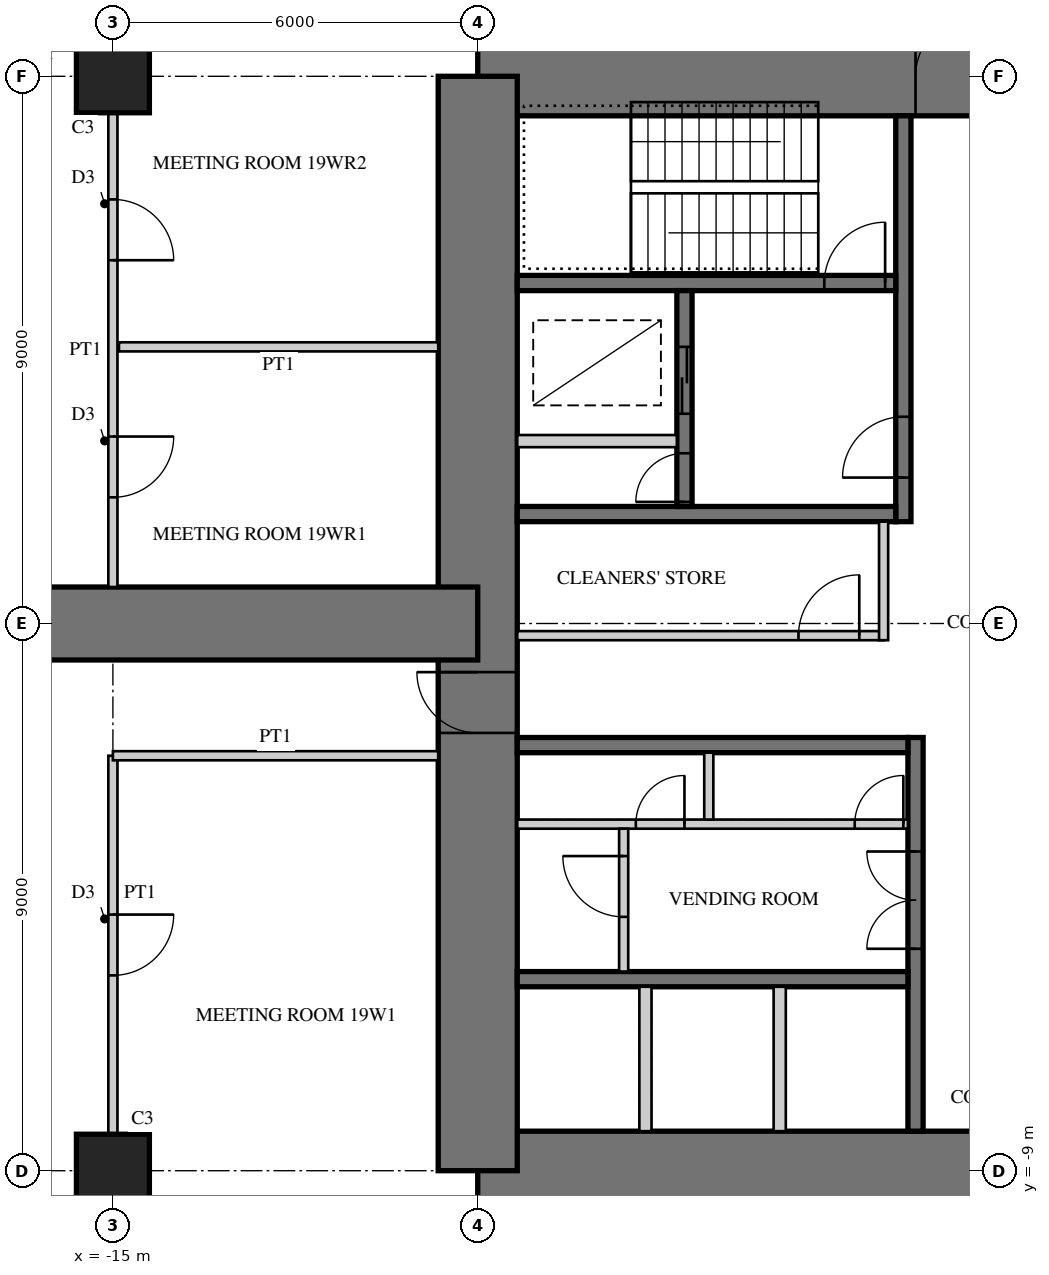
"""IFC4 building model, lengths in metres.
Left out: names, types, materials, properties, quantities, classifications, styles, units other than length and angle.
Written with IfcOpenShell. Run it as: python <this file> out.ifc"""

import sys

from ifc_helpers import new_model, si_unit, direction, frame, frame_2d, origin, origin_2d, place, context, subcontext, project, spatial, rectangle, extrude, element, fill, save


model = new_model("IFC4")
c1 = context("Model", 3, precision=1e-05, world=origin(), true_north=direction((0.0, 1.0)))
c2 = subcontext(c1, "Body", "Model", "MODEL_VIEW")
j1 = project(units=[si_unit("LENGTHUNIT", "METRE"), si_unit("PLANEANGLEUNIT", "RADIAN")], contexts=[c1])
p1 = place(None, origin())
s1 = spatial("IfcSite", under=j1, at=p1, CompositionType="ELEMENT")
p2 = place(p1, origin())
s2 = spatial("IfcBuilding", under=s1, at=p2, CompositionType="ELEMENT")
p3 = place(p2, frame((0.0, 0.0, 79.5)))
s3 = spatial("IfcBuildingStorey", under=s2, at=p3, CompositionType="ELEMENT", Elevation=79.5)
p4 = place(p3, frame((9.0, 9.0, 0.0), z_axis=(0.0, 0.0, 1.0), x_axis=(-1.0, 0.0, 0.0)))
e1 = element("IfcWall", 1, at=p4, inside=s3, PredefinedType="SHEAR", context=c2, shape_type="SweptSolid", body=[
    extrude(rectangle(XDim=18.0, YDim=1.3, at=frame_2d((9.0, 0.0))), origin(), (0.0, 0.0, 1.0), 4.0),
])
p5 = place(p4, frame((9.8, 0.0, 0.0)))
e2 = element("IfcOpeningElement", 2, at=p5, cuts=e1, PredefinedType="OPENING", context=c2, shape_type="SweptSolid", body=[
    extrude(rectangle(XDim=1.0, YDim=2.4, at=frame_2d((0.5, 1.2))), frame((0.0, 0.66, 0.0), z_axis=(0.0, -1.0, 0.0), x_axis=(1.0, 0.0, 0.0)), (0.0, 0.0, 1.0), 1.32),
])
p6 = place(p3, frame((-9.0, -9.0, 0.0), z_axis=(0.0, 0.0, 1.0), x_axis=(1.0, 0.0, 0.0)))
e3 = element("IfcWall", 3, at=p6, inside=s3, PredefinedType="SHEAR", context=c2, shape_type="SweptSolid", body=[
    extrude(rectangle(XDim=18.0, YDim=1.3, at=frame_2d((9.0, 0.0))), origin(), (0.0, 0.0, 1.0), 4.0),
])
p7 = place(p6, frame((9.8, 0.0, 0.0)))
e4 = element("IfcOpeningElement", 4, at=p7, cuts=e3, PredefinedType="OPENING", context=c2, shape_type="SweptSolid", body=[
    extrude(rectangle(XDim=1.0, YDim=2.4, at=frame_2d((0.5, 1.2))), frame((0.0, 0.66, 0.0), z_axis=(0.0, -1.0, 0.0), x_axis=(1.0, 0.0, 0.0)), (0.0, 0.0, 1.0), 1.32),
])
p8 = place(p3, frame((-9.0, 9.0, 0.0), z_axis=(0.0, 0.0, 1.0), x_axis=(0.0, -1.0, 0.0)))
e5 = element("IfcWall", 5, at=p8, inside=s3, PredefinedType="SHEAR", context=c2, shape_type="SweptSolid", body=[
    extrude(rectangle(XDim=18.0, YDim=1.3, at=frame_2d((9.0, 0.0))), origin(), (0.0, 0.0, 1.0), 4.0),
])
p9 = place(p8, frame((9.8, 0.0, 0.0)))
e6 = element("IfcOpeningElement", 6, at=p9, cuts=e5, PredefinedType="OPENING", context=c2, shape_type="SweptSolid", body=[
    extrude(rectangle(XDim=1.0, YDim=2.4, at=frame_2d((0.5, 1.2))), frame((0.0, 0.66, 0.0), z_axis=(0.0, -1.0, 0.0), x_axis=(1.0, 0.0, 0.0)), (0.0, 0.0, 1.0), 1.32),
])
p10 = place(p3, frame((-2.0, 1.675, 0.0), z_axis=(0.0, 0.0, 1.0), x_axis=(0.0, 1.0, 0.0)))
e7 = element("IfcWall", 7, at=p10, inside=s3, PredefinedType="SHEAR", context=c2, shape_type="SweptSolid", body=[
    extrude(rectangle(XDim=6.675, YDim=0.25, at=frame_2d((3.337, 0.0))), origin(), (0.0, 0.0, 1.0), 4.0),
])
p11 = place(p10, frame((0.725, 0.0, 0.0)))
e8 = element("IfcOpeningElement", 8, at=p11, cuts=e7, PredefinedType="OPENING", context=c2, shape_type="SweptSolid", body=[
    extrude(rectangle(XDim=1.0, YDim=2.1, at=frame_2d((0.5, 1.05))), frame((0.0, 0.135, 0.0), z_axis=(0.0, -1.0, 0.0), x_axis=(1.0, 0.0, 0.0)), (0.0, 0.0, 1.0), 0.27),
])
p12 = place(p3, frame((-2.125, 1.8, 0.0), z_axis=(0.0, 0.0, 1.0), x_axis=(-1.0, 0.0, 0.0)))
e9 = element("IfcWall", 9, at=p12, inside=s3, PredefinedType="SHEAR", context=c2, shape_type="SweptSolid", body=[
    extrude(rectangle(XDim=6.225, YDim=0.25, at=frame_2d((3.113, 0.0))), origin(), (0.0, 0.0, 1.0), 4.0),
])
p13 = place(p3, frame((-2.125, 5.6, 0.0), z_axis=(0.0, 0.0, 1.0), x_axis=(-1.0, 0.0, 0.0)))
e10 = element("IfcWall", 10, at=p13, inside=s3, PredefinedType="SHEAR", context=c2, shape_type="SweptSolid", body=[
    extrude(rectangle(XDim=6.225, YDim=0.25, at=frame_2d((3.113, 0.0))), origin(), (0.0, 0.0, 1.0), 4.0),
])
p14 = place(p13, frame((0.175, 0.0, 0.0)))
e11 = element("IfcOpeningElement", 11, at=p14, cuts=e10, PredefinedType="OPENING", context=c2, shape_type="SweptSolid", body=[
    extrude(rectangle(XDim=1.0, YDim=2.1, at=frame_2d((0.5, 1.05))), frame((0.0, 0.135, 0.0), z_axis=(0.0, -1.0, 0.0), x_axis=(1.0, 0.0, 0.0)), (0.0, 0.0, 1.0), 0.27),
])
p15 = place(p3, frame((-5.6, 1.925, 0.0), z_axis=(0.0, 0.0, 1.0), x_axis=(0.0, 1.0, 0.0)))
e12 = element("IfcWall", 12, at=p15, inside=s3, PredefinedType="SHEAR", context=c2, shape_type="SweptSolid", body=[
    extrude(rectangle(XDim=3.55, YDim=0.25, at=frame_2d((1.775, 0.0))), origin(), (0.0, 0.0, 1.0), 4.0),
])
p16 = place(p15, frame((1.525, 0.0, 0.0)))
e13 = element("IfcOpeningElement", 13, at=p16, cuts=e12, PredefinedType="OPENING", context=c2, shape_type="SweptSolid", body=[
    extrude(rectangle(XDim=1.1, YDim=2.2, at=frame_2d((0.55, 1.1))), frame((0.0, 0.135, 0.0), z_axis=(0.0, -1.0, 0.0), x_axis=(1.0, 0.0, 0.0)), (0.0, 0.0, 1.0), 0.27),
])
p17 = place(p15, frame((0.075, 0.0, 0.0)))
e14 = element("IfcOpeningElement", 14, at=p17, cuts=e12, PredefinedType="OPENING", context=c2, shape_type="SweptSolid", body=[
    extrude(rectangle(XDim=0.8, YDim=2.1, at=frame_2d((0.4, 1.05))), frame((0.0, 0.135, 0.0), z_axis=(0.0, -1.0, 0.0), x_axis=(1.0, 0.0, 0.0)), (0.0, 0.0, 1.0), 0.27),
])
p18 = place(p3, frame((-5.725, 3.0, 0.0), z_axis=(0.0, 0.0, 1.0), x_axis=(-1.0, 0.0, 0.0)))
e15 = element("IfcWall", 15, at=p18, inside=s3, PredefinedType="PARTITIONING", context=c2, shape_type="SweptSolid", body=[
    extrude(rectangle(XDim=2.625, YDim=0.2, at=frame_2d((1.312, 0.0))), origin(), (0.0, 0.0, 1.0), 4.0),
])
p19 = place(p3, frame((-1.8, -1.875, 0.0), z_axis=(0.0, 0.0, 1.0), x_axis=(0.0, -1.0, 0.0)))
e16 = element("IfcWall", 16, at=p19, inside=s3, PredefinedType="SHEAR", context=c2, shape_type="SweptSolid", body=[
    extrude(rectangle(XDim=6.475, YDim=0.25, at=frame_2d((3.238, 0.0))), origin(), (0.0, 0.0, 1.0), 4.0),
])
p20 = place(p19, frame((1.875, 0.0, 0.0)))
e17 = element("IfcOpeningElement", 17, at=p20, cuts=e16, PredefinedType="OPENING", context=c2, shape_type="SweptSolid", body=[
    extrude(rectangle(XDim=1.6, YDim=2.4, at=frame_2d((0.8, 1.2))), frame((0.0, 0.135, 0.0), z_axis=(0.0, -1.0, 0.0), x_axis=(1.0, 0.0, 0.0)), (0.0, 0.0, 1.0), 0.27),
])
for number, where, z_axis, x_axis in (
    (18, (-1.925, -2.0, 0.0), (0.0, 0.0, 1.0), (-1.0, 0.0, 0.0)),
    (19, (-1.925, -5.85, 0.0), (0.0, 0.0, 1.0), (-1.0, 0.0, 0.0)),
):
    element("IfcWall", number, at=place(p3, frame(where, z_axis=z_axis, x_axis=x_axis)), inside=s3, PredefinedType="SHEAR", context=c2, shape_type="SweptSolid", body=[
        extrude(rectangle(XDim=6.425, YDim=0.25, at=frame_2d((3.212, 0.0))), origin(), (0.0, 0.0, 1.0), 4.0),
    ])
p21 = place(p3, frame((-1.925, -3.3, 0.0), z_axis=(0.0, 0.0, 1.0), x_axis=(-1.0, 0.0, 0.0)))
e20 = element("IfcWall", 20, at=p21, inside=s3, PredefinedType="PARTITIONING", context=c2, shape_type="SweptSolid", body=[
    extrude(rectangle(XDim=6.425, YDim=0.15, at=frame_2d((3.212, 0.0))), origin(), (0.0, 0.0, 1.0), 4.0),
])
p22 = place(p21, frame((0.075, 0.0, 0.0)))
e21 = element("IfcOpeningElement", 21, at=p22, cuts=e20, PredefinedType="OPENING", context=c2, shape_type="SweptSolid", body=[
    extrude(rectangle(XDim=0.8, YDim=2.1, at=frame_2d((0.4, 1.05))), frame((0.0, 0.085, 0.0), z_axis=(0.0, -1.0, 0.0), x_axis=(1.0, 0.0, 0.0)), (0.0, 0.0, 1.0), 0.17),
])
p23 = place(p21, frame((3.675, 0.0, 0.0)))
e22 = element("IfcOpeningElement", 22, at=p23, cuts=e20, PredefinedType="OPENING", context=c2, shape_type="SweptSolid", body=[
    extrude(rectangle(XDim=0.8, YDim=2.1, at=frame_2d((0.4, 1.05))), frame((0.0, 0.085, 0.0), z_axis=(0.0, -1.0, 0.0), x_axis=(1.0, 0.0, 0.0)), (0.0, 0.0, 1.0), 0.17),
])
p24 = place(p3, frame((-5.2, -2.125, 0.0), z_axis=(0.0, 0.0, 1.0), x_axis=(0.0, -1.0, 0.0)))
e23 = element("IfcWall", 23, at=p24, inside=s3, PredefinedType="PARTITIONING", context=c2, shape_type="SweptSolid", body=[
    extrude(rectangle(XDim=1.1, YDim=0.15, at=frame_2d((0.55, 0.0))), origin(), (0.0, 0.0, 1.0), 4.0),
])
for number, where, z_axis, x_axis in (
    (24, (-4.033, -5.975, 0.0), (0.0, 0.0, 1.0), (0.0, -1.0, 0.0)),
    (25, (-6.242, -5.975, 0.0), (0.0, 0.0, 1.0), (0.0, -1.0, 0.0)),
):
    element("IfcWall", number, at=place(p3, frame(where, z_axis=z_axis, x_axis=x_axis)), inside=s3, PredefinedType="PARTITIONING", context=c2, shape_type="SweptSolid", body=[
        extrude(rectangle(XDim=2.375, YDim=0.2, at=frame_2d((1.188, 0.0))), origin(), (0.0, 0.0, 1.0), 4.0),
    ])
p25 = place(p3, frame((-9.0, 0.0, 0.0), z_axis=(0.0, 0.0, 1.0), x_axis=(-1.0, 0.0, 0.0)))
e26 = element("IfcWall", 26, at=p25, inside=s3, PredefinedType="SHEAR", context=c2, shape_type="SweptSolid", body=[
    extrude(rectangle(XDim=18.0, YDim=1.2, at=frame_2d((9.0, 0.0))), origin(), (0.0, 0.0, 1.0), 4.0),
])
p26 = place(p25, frame((9.9, 0.0, 0.0)))
e27 = element("IfcOpeningElement", 27, at=p26, cuts=e26, PredefinedType="OPENING", context=c2, shape_type="SweptSolid", body=[
    extrude(rectangle(XDim=1.0, YDim=2.2, at=frame_2d((0.5, 1.1))), frame((0.0, 0.61, 0.0), z_axis=(0.0, -1.0, 0.0), x_axis=(1.0, 0.0, 0.0)), (0.0, 0.0, 1.0), 1.22),
])
for number, where, z_axis, x_axis in (
    (28, (-15.0, 9.0, 0.0), (0.0, 0.0, 1.0), (1.0, 0.0, 0.0)),
    (29, (-15.0, -9.0, 0.0), (0.0, 0.0, 1.0), (1.0, 0.0, 0.0)),
):
    element("IfcColumn", number, at=place(p3, frame(where, z_axis=z_axis, x_axis=x_axis)), inside=s3, PredefinedType="COLUMN", context=c2, shape_type="SweptSolid", body=[
        extrude(rectangle(XDim=1.2, YDim=1.2, at=origin_2d()), origin(), (0.0, 0.0, 1.0), 4.0),
    ])
p27 = place(p3, frame((-2.325, -0.2, 0.0), z_axis=(0.0, 0.0, 1.0), x_axis=(-1.0, 0.0, 0.0)))
e30 = element("IfcWall", 30, at=p27, inside=s3, PredefinedType="PARTITIONING", context=c2, shape_type="SweptSolid", body=[
    extrude(rectangle(XDim=6.025, YDim=0.15, at=frame_2d((3.013, 0.0))), origin(), (0.0, 0.0, 1.0), 3.8),
])
p28 = place(p27, frame((0.4, 0.0, 0.0)))
e31 = element("IfcOpeningElement", 31, at=p28, cuts=e30, PredefinedType="OPENING", context=c2, shape_type="SweptSolid", body=[
    extrude(rectangle(XDim=1.0, YDim=2.1, at=frame_2d((0.5, 1.05))), frame((0.0, 0.085, 0.0), z_axis=(0.0, -1.0, 0.0), x_axis=(1.0, 0.0, 0.0)), (0.0, 0.0, 1.0), 0.17),
])
p29 = place(p3, frame((-2.325, 1.675, 0.0), z_axis=(0.0, 0.0, 1.0), x_axis=(0.0, -1.0, 0.0)))
e32 = element("IfcWall", 32, at=p29, inside=s3, PredefinedType="PARTITIONING", context=c2, shape_type="SweptSolid", body=[
    extrude(rectangle(XDim=1.95, YDim=0.15, at=frame_2d((0.975, 0.0))), origin(), (0.0, 0.0, 1.0), 3.8),
])
p30 = place(p3, frame((-6.6, -3.375, 0.0), z_axis=(0.0, 0.0, 1.0), x_axis=(0.0, -1.0, 0.0)))
e33 = element("IfcWall", 33, at=p30, inside=s3, PredefinedType="PARTITIONING", context=c2, shape_type="SweptSolid", body=[
    extrude(rectangle(XDim=2.35, YDim=0.15, at=frame_2d((1.175, 0.0))), origin(), (0.0, 0.0, 1.0), 3.8),
])
p31 = place(p30, frame((0.45, 0.0, 0.0)))
e34 = element("IfcOpeningElement", 34, at=p31, cuts=e33, PredefinedType="OPENING", context=c2, shape_type="SweptSolid", body=[
    extrude(rectangle(XDim=1.0, YDim=2.1, at=frame_2d((0.5, 1.05))), frame((0.0, 0.085, 0.0), z_axis=(0.0, -1.0, 0.0), x_axis=(1.0, 0.0, 0.0)), (0.0, 0.0, 1.0), 0.17),
])
p32 = place(p3, frame((-15.0, -2.175, 0.0), z_axis=(0.0, 0.0, 1.0), x_axis=(0.0, -1.0, 0.0)))
e35 = element("IfcWall", 35, at=p32, inside=s3, PredefinedType="PARTITIONING", context=c2, shape_type="SweptSolid", body=[
    extrude(rectangle(XDim=6.225, YDim=0.15, at=frame_2d((3.112, 0.0))), origin(), (0.0, 0.0, 1.0), 2.95),
])
p33 = place(p32, frame((2.613, 0.0, 0.0)))
e36 = element("IfcOpeningElement", 36, at=p33, cuts=e35, PredefinedType="OPENING", context=c2, shape_type="SweptSolid", body=[
    extrude(rectangle(XDim=1.0, YDim=2.1, at=frame_2d((0.5, 1.05))), frame((0.0, 0.085, 0.0), z_axis=(0.0, -1.0, 0.0), x_axis=(1.0, 0.0, 0.0)), (0.0, 0.0, 1.0), 0.17),
])
p34 = place(p3, frame((-9.65, -2.175, 0.0), z_axis=(0.0, 0.0, 1.0), x_axis=(-1.0, 0.0, 0.0)))
e37 = element("IfcWall", 37, at=p34, inside=s3, PredefinedType="PARTITIONING", context=c2, shape_type="SweptSolid", body=[
    extrude(rectangle(XDim=5.35, YDim=0.15, at=frame_2d((2.675, 0.0))), origin(), (0.0, 0.0, 1.0), 3.8),
])
p35 = place(p3, frame((-15.0, 8.4, 0.0), z_axis=(0.0, 0.0, 1.0), x_axis=(0.0, -1.0, 0.0)))
e38 = element("IfcWall", 38, at=p35, inside=s3, PredefinedType="PARTITIONING", context=c2, shape_type="SweptSolid", body=[
    extrude(rectangle(XDim=7.8, YDim=0.15, at=frame_2d((3.9, 0.0))), origin(), (0.0, 0.0, 1.0), 2.95),
])
p36 = place(p35, frame((1.425, 0.0, 0.0)))
e39 = element("IfcOpeningElement", 39, at=p36, cuts=e38, PredefinedType="OPENING", context=c2, shape_type="SweptSolid", body=[
    extrude(rectangle(XDim=1.0, YDim=2.1, at=frame_2d((0.5, 1.05))), frame((0.0, 0.085, 0.0), z_axis=(0.0, -1.0, 0.0), x_axis=(1.0, 0.0, 0.0)), (0.0, 0.0, 1.0), 0.17),
])
p37 = place(p35, frame((5.325, 0.0, 0.0)))
e40 = element("IfcOpeningElement", 40, at=p37, cuts=e38, PredefinedType="OPENING", context=c2, shape_type="SweptSolid", body=[
    extrude(rectangle(XDim=1.0, YDim=2.1, at=frame_2d((0.5, 1.05))), frame((0.0, 0.085, 0.0), z_axis=(0.0, -1.0, 0.0), x_axis=(1.0, 0.0, 0.0)), (0.0, 0.0, 1.0), 0.17),
])
p38 = place(p3, frame((-9.65, 4.55, 0.0), z_axis=(0.0, 0.0, 1.0), x_axis=(-1.0, 0.0, 0.0)))
e41 = element("IfcWall", 41, at=p38, inside=s3, PredefinedType="PARTITIONING", context=c2, shape_type="SweptSolid", body=[
    extrude(rectangle(XDim=5.25, YDim=0.15, at=frame_2d((2.625, 0.0))), origin(), (0.0, 0.0, 1.0), 3.8),
])
p39 = place(p28, frame((1.0, 0.0, 0.0), z_axis=(0.0, 0.0, 1.0), x_axis=(-1.0, 0.0, 0.0)))
e42 = element("IfcDoor", 42, at=p39, inside=s3, OperationType="SINGLE_SWING_RIGHT", PredefinedType="DOOR", context=c2, shape_type="SweptSolid", body=[
    extrude(rectangle(XDim=1.0, YDim=2.1, at=frame_2d((0.5, 1.05))), frame((0.0, 0.025, 0.0), z_axis=(0.0, -1.0, 0.0), x_axis=(1.0, 0.0, 0.0)), (0.0, 0.0, 1.0), 0.05),
])
fill(e31, e42)
p40 = place(p31, frame((1.0, 0.0, 0.0), z_axis=(0.0, 0.0, 1.0), x_axis=(-1.0, 0.0, 0.0)))
e43 = element("IfcDoor", 43, at=p40, inside=s3, OperationType="SINGLE_SWING_RIGHT", PredefinedType="DOOR", context=c2, shape_type="SweptSolid", body=[
    extrude(rectangle(XDim=1.0, YDim=2.1, at=frame_2d((0.5, 1.05))), frame((0.0, 0.025, 0.0), z_axis=(0.0, -1.0, 0.0), x_axis=(1.0, 0.0, 0.0)), (0.0, 0.0, 1.0), 0.05),
])
fill(e34, e43)
p41 = place(p33, origin())
e44 = element("IfcDoor", 44, at=p41, inside=s3, OperationType="SINGLE_SWING_LEFT", PredefinedType="DOOR", context=c2, shape_type="SweptSolid", body=[
    extrude(rectangle(XDim=1.0, YDim=2.1, at=frame_2d((0.5, 1.05))), frame((0.0, 0.025, 0.0), z_axis=(0.0, -1.0, 0.0), x_axis=(1.0, 0.0, 0.0)), (0.0, 0.0, 1.0), 0.05),
])
fill(e36, e44)
p42 = place(p36, origin())
e45 = element("IfcDoor", 45, at=p42, inside=s3, OperationType="SINGLE_SWING_RIGHT", PredefinedType="DOOR", context=c2, shape_type="SweptSolid", body=[
    extrude(rectangle(XDim=1.0, YDim=2.1, at=frame_2d((0.5, 1.05))), frame((0.0, 0.025, 0.0), z_axis=(0.0, -1.0, 0.0), x_axis=(1.0, 0.0, 0.0)), (0.0, 0.0, 1.0), 0.05),
])
fill(e39, e45)
p43 = place(p37, origin())
e46 = element("IfcDoor", 46, at=p43, inside=s3, OperationType="SINGLE_SWING_LEFT", PredefinedType="DOOR", context=c2, shape_type="SweptSolid", body=[
    extrude(rectangle(XDim=1.0, YDim=2.1, at=frame_2d((0.5, 1.05))), frame((0.0, 0.025, 0.0), z_axis=(0.0, -1.0, 0.0), x_axis=(1.0, 0.0, 0.0)), (0.0, 0.0, 1.0), 0.05),
])
fill(e40, e46)
p44 = place(p5, frame((1.0, 0.0, 0.0), z_axis=(0.0, 0.0, 1.0), x_axis=(-1.0, 0.0, 0.0)))
e47 = element("IfcDoor", 47, at=p44, inside=s3, OperationType="SINGLE_SWING_RIGHT", PredefinedType="DOOR", context=c2, shape_type="SweptSolid", body=[
    extrude(rectangle(XDim=1.0, YDim=2.4, at=frame_2d((0.5, 1.2))), frame((0.0, -0.005, 0.0), z_axis=(0.0, -1.0, 0.0), x_axis=(1.0, 0.0, 0.0)), (0.0, 0.0, 1.0), 0.05),
])
fill(e2, e47)
p45 = place(p9, frame((1.0, 0.0, 0.0), z_axis=(0.0, 0.0, 1.0), x_axis=(-1.0, 0.0, 0.0)))
e48 = element("IfcDoor", 48, at=p45, inside=s3, OperationType="SINGLE_SWING_RIGHT", PredefinedType="DOOR", context=c2, shape_type="SweptSolid", body=[
    extrude(rectangle(XDim=1.0, YDim=2.4, at=frame_2d((0.5, 1.2))), frame((0.0, -0.005, 0.0), z_axis=(0.0, -1.0, 0.0), x_axis=(1.0, 0.0, 0.0)), (0.0, 0.0, 1.0), 0.05),
])
fill(e6, e48)
p46 = place(p11, origin())
e49 = element("IfcDoor", 49, at=p46, inside=s3, OperationType="SINGLE_SWING_LEFT", PredefinedType="DOOR", context=c2, shape_type="SweptSolid", body=[
    extrude(rectangle(XDim=1.0, YDim=2.1, at=frame_2d((0.5, 1.05))), frame((0.0, 0.025, 0.0), z_axis=(0.0, -1.0, 0.0), x_axis=(1.0, 0.0, 0.0)), (0.0, 0.0, 1.0), 0.05),
])
fill(e8, e49)
p47 = place(p14, frame((1.0, 0.0, 0.0), z_axis=(0.0, 0.0, 1.0), x_axis=(-1.0, 0.0, 0.0)))
e50 = element("IfcDoor", 50, at=p47, inside=s3, OperationType="SINGLE_SWING_RIGHT", PredefinedType="DOOR", context=c2, shape_type="SweptSolid", body=[
    extrude(rectangle(XDim=1.0, YDim=2.1, at=frame_2d((0.5, 1.05))), frame((0.0, 0.025, 0.0), z_axis=(0.0, -1.0, 0.0), x_axis=(1.0, 0.0, 0.0)), (0.0, 0.0, 1.0), 0.05),
])
fill(e11, e50)
p48 = place(p16, origin())
e51 = element("IfcDoor", 51, at=p48, inside=s3, OperationType="DOUBLE_DOOR_SLIDING", PredefinedType="DOOR", context=c2, shape_type="SweptSolid", body=[
    extrude(rectangle(XDim=1.1, YDim=2.2, at=frame_2d((0.55, 1.1))), frame((0.0, 0.025, 0.0), z_axis=(0.0, -1.0, 0.0), x_axis=(1.0, 0.0, 0.0)), (0.0, 0.0, 1.0), 0.05),
])
fill(e13, e51)
p49 = place(p17, origin())
e52 = element("IfcDoor", 52, at=p49, inside=s3, OperationType="SINGLE_SWING_LEFT", PredefinedType="DOOR", context=c2, shape_type="SweptSolid", body=[
    extrude(rectangle(XDim=0.8, YDim=2.1, at=frame_2d((0.4, 1.05))), frame((0.0, 0.025, 0.0), z_axis=(0.0, -1.0, 0.0), x_axis=(1.0, 0.0, 0.0)), (0.0, 0.0, 1.0), 0.05),
])
fill(e14, e52)
p50 = place(p20, frame((1.6, 0.0, 0.0), z_axis=(0.0, 0.0, 1.0), x_axis=(-1.0, 0.0, 0.0)))
e53 = element("IfcDoor", 53, at=p50, inside=s3, OperationType="DOUBLE_DOOR_SINGLE_SWING", PredefinedType="DOOR", context=c2, shape_type="SweptSolid", body=[
    extrude(rectangle(XDim=1.6, YDim=2.4, at=frame_2d((0.8, 1.2))), frame((0.0, 0.025, 0.0), z_axis=(0.0, -1.0, 0.0), x_axis=(1.0, 0.0, 0.0)), (0.0, 0.0, 1.0), 0.05),
])
fill(e17, e53)
p51 = place(p22, frame((0.8, 0.0, 0.0), z_axis=(0.0, 0.0, 1.0), x_axis=(-1.0, 0.0, 0.0)))
e54 = element("IfcDoor", 54, at=p51, inside=s3, OperationType="SINGLE_SWING_RIGHT", PredefinedType="DOOR", context=c2, shape_type="SweptSolid", body=[
    extrude(rectangle(XDim=0.8, YDim=2.1, at=frame_2d((0.4, 1.05))), frame((0.0, 0.025, 0.0), z_axis=(0.0, -1.0, 0.0), x_axis=(1.0, 0.0, 0.0)), (0.0, 0.0, 1.0), 0.05),
])
fill(e21, e54)
p52 = place(p23, frame((0.8, 0.0, 0.0), z_axis=(0.0, 0.0, 1.0), x_axis=(-1.0, 0.0, 0.0)))
e55 = element("IfcDoor", 55, at=p52, inside=s3, OperationType="SINGLE_SWING_RIGHT", PredefinedType="DOOR", context=c2, shape_type="SweptSolid", body=[
    extrude(rectangle(XDim=0.8, YDim=2.1, at=frame_2d((0.4, 1.05))), frame((0.0, 0.025, 0.0), z_axis=(0.0, -1.0, 0.0), x_axis=(1.0, 0.0, 0.0)), (0.0, 0.0, 1.0), 0.05),
])
fill(e22, e55)
save(model, sys.argv[1])
